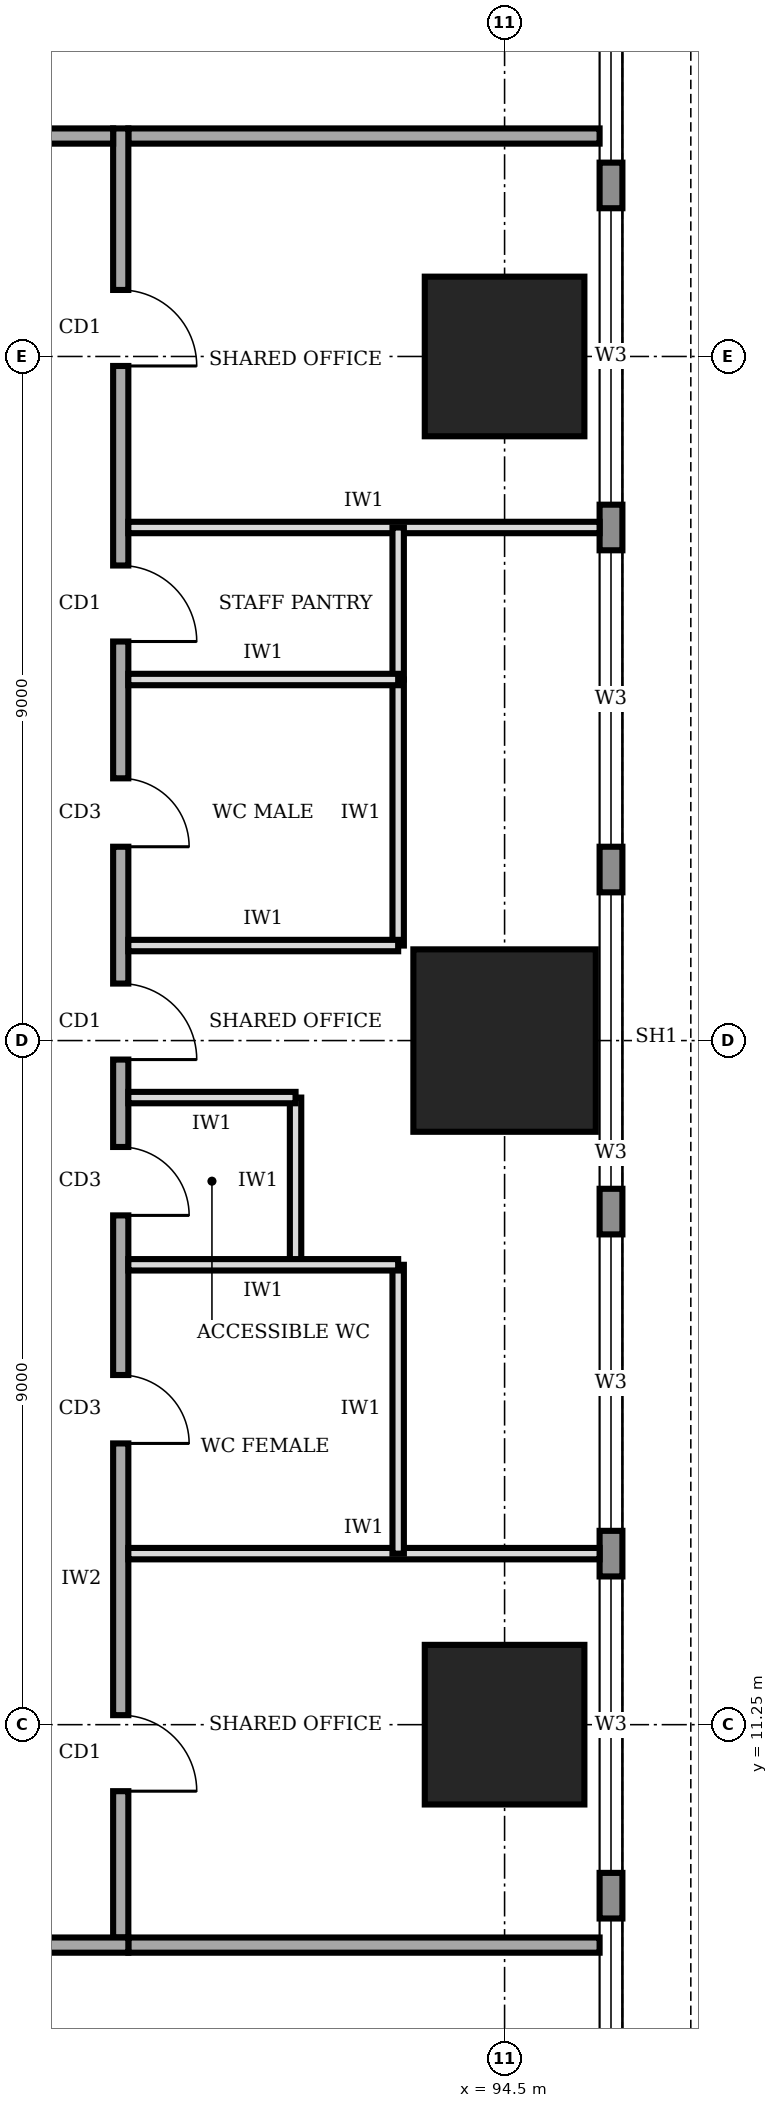
"""IFC4 building model, lengths in metres.
Left out: names, types, materials, properties, quantities, classifications, styles, units other than length and angle.
Written with IfcOpenShell. Run it as: python <this file> out.ifc"""

import sys

from ifc_helpers import new_model, si_unit, direction, frame, frame_2d, origin, origin_2d, place, context, subcontext, project, spatial, rectangle, extrude, element, fill, save


model = new_model("IFC4")
c1 = context("Model", 3, precision=1e-05, world=origin(), true_north=direction((0.0, 1.0)))
c2 = subcontext(c1, "Body", "Model", "MODEL_VIEW")
j1 = project(units=[si_unit("LENGTHUNIT", "METRE"), si_unit("PLANEANGLEUNIT", "RADIAN")], contexts=[c1])
p1 = place(None, origin())
s1 = spatial("IfcSite", under=j1, at=p1, CompositionType="ELEMENT")
p2 = place(p1, origin())
s2 = spatial("IfcBuilding", under=s1, at=p2, CompositionType="ELEMENT")
p3 = place(p2, frame((0.0, 0.0, 97.0)))
s3 = spatial("IfcBuildingStorey", under=s2, at=p3, CompositionType="ELEMENT", Elevation=97.0)
p4 = place(p3, frame((94.5, 11.25, 0.0), z_axis=(0.0, 0.0, 1.0), x_axis=(1.0, 0.0, 0.0)))
e1 = element("IfcColumn", 1, at=p4, inside=s3, PredefinedType="COLUMN", context=c2, shape_type="SweptSolid", body=[
    extrude(rectangle(XDim=2.1, YDim=2.1, at=origin_2d()), origin(), (0.0, 0.0, 1.0), 4.0),
])
p5 = place(p3, frame((94.5, 20.25, 0.0), z_axis=(0.0, 0.0, 1.0), x_axis=(1.0, 0.0, 0.0)))
e2 = element("IfcColumn", 2, at=p5, inside=s3, PredefinedType="COLUMN", context=c2, shape_type="SweptSolid", body=[
    extrude(rectangle(XDim=2.4, YDim=2.4, at=origin_2d()), origin(), (0.0, 0.0, 1.0), 4.0),
])
p6 = place(p3, frame((94.5, 29.25, 0.0), z_axis=(0.0, 0.0, 1.0), x_axis=(1.0, 0.0, 0.0)))
e3 = element("IfcColumn", 3, at=p6, inside=s3, PredefinedType="COLUMN", context=c2, shape_type="SweptSolid", body=[
    extrude(rectangle(XDim=2.1, YDim=2.1, at=origin_2d()), origin(), (0.0, 0.0, 1.0), 4.0),
])
p7 = place(p3, frame((95.9, 3.32, 0.0), z_axis=(0.0, 0.0, 1.0), x_axis=(0.0, 1.0, 0.0)))
e4 = element("IfcWall", 4, at=p7, inside=s3, PredefinedType="STANDARD", context=c2, shape_type="SweptSolid", body=[
    extrude(rectangle(XDim=33.96, YDim=0.3, at=frame_2d((16.98, 0.0))), origin(), (0.0, 0.0, 1.0), 3.75),
])
p8 = place(p7, frame((1.48, 0.0, 0.95)))
e5 = element("IfcOpeningElement", 5, at=p8, cuts=e4, PredefinedType="OPENING", context=c2, shape_type="SweptSolid", body=[
    extrude(rectangle(XDim=3.9, YDim=1.8, at=frame_2d((1.95, 0.9))), frame((0.0, 0.16, 0.0), z_axis=(0.0, -1.0, 0.0), x_axis=(1.0, 0.0, 0.0)), (0.0, 0.0, 1.0), 0.32),
])
p9 = place(p7, frame((5.98, 0.0, 0.95)))
e6 = element("IfcOpeningElement", 6, at=p9, cuts=e4, PredefinedType="OPENING", context=c2, shape_type="SweptSolid", body=[
    extrude(rectangle(XDim=3.9, YDim=1.8, at=frame_2d((1.95, 0.9))), frame((0.0, 0.16, 0.0), z_axis=(0.0, -1.0, 0.0), x_axis=(1.0, 0.0, 0.0)), (0.0, 0.0, 1.0), 0.32),
])
p10 = place(p7, frame((10.48, 0.0, 0.95)))
e7 = element("IfcOpeningElement", 7, at=p10, cuts=e4, PredefinedType="OPENING", context=c2, shape_type="SweptSolid", body=[
    extrude(rectangle(XDim=3.9, YDim=1.8, at=frame_2d((1.95, 0.9))), frame((0.0, 0.16, 0.0), z_axis=(0.0, -1.0, 0.0), x_axis=(1.0, 0.0, 0.0)), (0.0, 0.0, 1.0), 0.32),
])
p11 = place(p7, frame((14.98, 0.0, 0.95)))
e8 = element("IfcOpeningElement", 8, at=p11, cuts=e4, PredefinedType="OPENING", context=c2, shape_type="SweptSolid", body=[
    extrude(rectangle(XDim=3.9, YDim=1.8, at=frame_2d((1.95, 0.9))), frame((0.0, 0.16, 0.0), z_axis=(0.0, -1.0, 0.0), x_axis=(1.0, 0.0, 0.0)), (0.0, 0.0, 1.0), 0.32),
])
p12 = place(p7, frame((19.48, 0.0, 0.95)))
e9 = element("IfcOpeningElement", 9, at=p12, cuts=e4, PredefinedType="OPENING", context=c2, shape_type="SweptSolid", body=[
    extrude(rectangle(XDim=3.9, YDim=1.8, at=frame_2d((1.95, 0.9))), frame((0.0, 0.16, 0.0), z_axis=(0.0, -1.0, 0.0), x_axis=(1.0, 0.0, 0.0)), (0.0, 0.0, 1.0), 0.32),
])
p13 = place(p7, frame((23.98, 0.0, 0.95)))
e10 = element("IfcOpeningElement", 10, at=p13, cuts=e4, PredefinedType="OPENING", context=c2, shape_type="SweptSolid", body=[
    extrude(rectangle(XDim=3.9, YDim=1.8, at=frame_2d((1.95, 0.9))), frame((0.0, 0.16, 0.0), z_axis=(0.0, -1.0, 0.0), x_axis=(1.0, 0.0, 0.0)), (0.0, 0.0, 1.0), 0.32),
])
p14 = place(p7, frame((28.48, 0.0, 0.95)))
e11 = element("IfcOpeningElement", 11, at=p14, cuts=e4, PredefinedType="OPENING", context=c2, shape_type="SweptSolid", body=[
    extrude(rectangle(XDim=3.9, YDim=1.8, at=frame_2d((1.95, 0.9))), frame((0.0, 0.16, 0.0), z_axis=(0.0, -1.0, 0.0), x_axis=(1.0, 0.0, 0.0)), (0.0, 0.0, 1.0), 0.32),
])
p15 = place(p3, frame((63.3, 8.35, 0.0), z_axis=(0.0, 0.0, 1.0), x_axis=(1.0, 0.0, 0.0)))
e12 = element("IfcWall", 12, at=p15, inside=s3, PredefinedType="SOLIDWALL", context=c2, shape_type="SweptSolid", body=[
    extrude(rectangle(XDim=26.25, YDim=0.2, at=frame_2d((13.125, 0.0))), origin(), (0.0, 0.0, 1.0), 3.75),
])
p16 = place(p15, frame((8.25, 0.0, 0.0)))
e13 = element("IfcOpeningElement", 13, at=p16, cuts=e12, PredefinedType="OPENING", context=c2, shape_type="SweptSolid", body=[
    extrude(rectangle(XDim=1.0, YDim=2.1, at=frame_2d((0.5, 1.05))), frame((0.0, 0.11, 0.0), z_axis=(0.0, -1.0, 0.0), x_axis=(1.0, 0.0, 0.0)), (0.0, 0.0, 1.0), 0.22),
])
p17 = place(p15, frame((19.45, 0.0, 0.0)))
e14 = element("IfcOpeningElement", 14, at=p17, cuts=e12, PredefinedType="OPENING", context=c2, shape_type="SweptSolid", body=[
    extrude(rectangle(XDim=1.0, YDim=2.1, at=frame_2d((0.5, 1.05))), frame((0.0, 0.11, 0.0), z_axis=(0.0, -1.0, 0.0), x_axis=(1.0, 0.0, 0.0)), (0.0, 0.0, 1.0), 0.22),
])
p18 = place(p15, frame((23.825, 0.0, 0.0)))
e15 = element("IfcOpeningElement", 15, at=p18, cuts=e12, PredefinedType="OPENING", context=c2, shape_type="SweptSolid", body=[
    extrude(rectangle(XDim=1.0, YDim=2.1, at=frame_2d((0.5, 1.05))), frame((0.0, 0.11, 0.0), z_axis=(0.0, -1.0, 0.0), x_axis=(1.0, 0.0, 0.0)), (0.0, 0.0, 1.0), 0.22),
])
p19 = place(p3, frame((89.45, 8.45, 0.0), z_axis=(0.0, 0.0, 1.0), x_axis=(0.0, 1.0, 0.0)))
e16 = element("IfcWall", 16, at=p19, inside=s3, PredefinedType="SOLIDWALL", context=c2, shape_type="SweptSolid", body=[
    extrude(rectangle(XDim=23.8, YDim=0.2, at=frame_2d((11.9, 0.0))), origin(), (0.0, 0.0, 1.0), 3.75),
])
p20 = place(p19, frame((1.925, 0.0, 0.0)))
e17 = element("IfcOpeningElement", 17, at=p20, cuts=e16, PredefinedType="OPENING", context=c2, shape_type="SweptSolid", body=[
    extrude(rectangle(XDim=1.0, YDim=2.1, at=frame_2d((0.5, 1.05))), frame((0.0, 0.11, 0.0), z_axis=(0.0, -1.0, 0.0), x_axis=(1.0, 0.0, 0.0)), (0.0, 0.0, 1.0), 0.22),
])
p21 = place(p19, frame((6.5, 0.0, 0.0)))
e18 = element("IfcOpeningElement", 18, at=p21, cuts=e16, PredefinedType="OPENING", context=c2, shape_type="SweptSolid", body=[
    extrude(rectangle(XDim=0.9, YDim=2.1, at=frame_2d((0.45, 1.05))), frame((0.0, 0.11, 0.0), z_axis=(0.0, -1.0, 0.0), x_axis=(1.0, 0.0, 0.0)), (0.0, 0.0, 1.0), 0.22),
])
p22 = place(p19, frame((9.5, 0.0, 0.0)))
e19 = element("IfcOpeningElement", 19, at=p22, cuts=e16, PredefinedType="OPENING", context=c2, shape_type="SweptSolid", body=[
    extrude(rectangle(XDim=0.9, YDim=2.1, at=frame_2d((0.45, 1.05))), frame((0.0, 0.11, 0.0), z_axis=(0.0, -1.0, 0.0), x_axis=(1.0, 0.0, 0.0)), (0.0, 0.0, 1.0), 0.22),
])
p23 = place(p19, frame((14.35, 0.0, 0.0)))
e20 = element("IfcOpeningElement", 20, at=p23, cuts=e16, PredefinedType="OPENING", context=c2, shape_type="SweptSolid", body=[
    extrude(rectangle(XDim=0.9, YDim=2.1, at=frame_2d((0.45, 1.05))), frame((0.0, 0.11, 0.0), z_axis=(0.0, -1.0, 0.0), x_axis=(1.0, 0.0, 0.0)), (0.0, 0.0, 1.0), 0.22),
])
p24 = place(p19, frame((17.05, 0.0, 0.0)))
e21 = element("IfcOpeningElement", 21, at=p24, cuts=e16, PredefinedType="OPENING", context=c2, shape_type="SweptSolid", body=[
    extrude(rectangle(XDim=1.0, YDim=2.1, at=frame_2d((0.5, 1.05))), frame((0.0, 0.11, 0.0), z_axis=(0.0, -1.0, 0.0), x_axis=(1.0, 0.0, 0.0)), (0.0, 0.0, 1.0), 0.22),
])
p25 = place(p19, frame((11.55, 0.0, 0.0)))
e22 = element("IfcOpeningElement", 22, at=p25, cuts=e16, PredefinedType="OPENING", context=c2, shape_type="SweptSolid", body=[
    extrude(rectangle(XDim=1.0, YDim=2.1, at=frame_2d((0.5, 1.05))), frame((0.0, 0.11, 0.0), z_axis=(0.0, -1.0, 0.0), x_axis=(1.0, 0.0, 0.0)), (0.0, 0.0, 1.0), 0.22),
])
p26 = place(p19, frame((20.675, 0.0, 0.0)))
e23 = element("IfcOpeningElement", 23, at=p26, cuts=e16, PredefinedType="OPENING", context=c2, shape_type="SweptSolid", body=[
    extrude(rectangle(XDim=1.0, YDim=2.1, at=frame_2d((0.5, 1.05))), frame((0.0, 0.11, 0.0), z_axis=(0.0, -1.0, 0.0), x_axis=(1.0, 0.0, 0.0)), (0.0, 0.0, 1.0), 0.22),
])
p27 = place(p3, frame((89.35, 32.15, 0.0), z_axis=(0.0, 0.0, 1.0), x_axis=(-1.0, 0.0, 0.0)))
e24 = element("IfcWall", 24, at=p27, inside=s3, PredefinedType="SOLIDWALL", context=c2, shape_type="SweptSolid", body=[
    extrude(rectangle(XDim=26.05, YDim=0.2, at=frame_2d((13.025, 0.0))), origin(), (0.0, 0.0, 1.0), 3.75),
])
p28 = place(p27, frame((19.05, 0.0, 0.0)))
e25 = element("IfcOpeningElement", 25, at=p28, cuts=e24, PredefinedType="OPENING", context=c2, shape_type="SweptSolid", body=[
    extrude(rectangle(XDim=1.0, YDim=2.1, at=frame_2d((0.5, 1.05))), frame((0.0, 0.11, 0.0), z_axis=(0.0, -1.0, 0.0), x_axis=(1.0, 0.0, 0.0)), (0.0, 0.0, 1.0), 0.22),
])
p29 = place(p27, frame((7.85, 0.0, 0.0)))
e26 = element("IfcOpeningElement", 26, at=p29, cuts=e24, PredefinedType="OPENING", context=c2, shape_type="SweptSolid", body=[
    extrude(rectangle(XDim=1.0, YDim=2.1, at=frame_2d((0.5, 1.05))), frame((0.0, 0.11, 0.0), z_axis=(0.0, -1.0, 0.0), x_axis=(1.0, 0.0, 0.0)), (0.0, 0.0, 1.0), 0.22),
])
p30 = place(p27, frame((1.325, 0.0, 0.0)))
e27 = element("IfcOpeningElement", 27, at=p30, cuts=e24, PredefinedType="OPENING", context=c2, shape_type="SweptSolid", body=[
    extrude(rectangle(XDim=1.0, YDim=2.1, at=frame_2d((0.5, 1.05))), frame((0.0, 0.11, 0.0), z_axis=(0.0, -1.0, 0.0), x_axis=(1.0, 0.0, 0.0)), (0.0, 0.0, 1.0), 0.22),
])
for number, where, z_axis, x_axis in (
    (28, (89.55, 8.35, 0.0), (0.0, 0.0, 1.0), (1.0, 0.0, 0.0)),
    (29, (89.55, 32.15, 0.0), (0.0, 0.0, 1.0), (1.0, 0.0, 0.0)),
):
    element("IfcWall", number, at=place(p3, frame(where, z_axis=z_axis, x_axis=x_axis)), inside=s3, PredefinedType="SOLIDWALL", context=c2, shape_type="SweptSolid", body=[
        extrude(rectangle(XDim=6.2, YDim=0.2, at=frame_2d((3.1, 0.0))), origin(), (0.0, 0.0, 1.0), 3.75),
    ])
for number, where, z_axis, x_axis in (
    (30, (89.55, 13.5, 0.0), (0.0, 0.0, 1.0), (1.0, 0.0, 0.0)),
    (31, (89.55, 27.0, 0.0), (0.0, 0.0, 1.0), (1.0, 0.0, 0.0)),
):
    element("IfcWall", number, at=place(p3, frame(where, z_axis=z_axis, x_axis=x_axis)), inside=s3, PredefinedType="PARTITIONING", context=c2, shape_type="SweptSolid", body=[
        extrude(rectangle(XDim=6.2, YDim=0.15, at=frame_2d((3.1, 0.0))), origin(), (0.0, 0.0, 1.0), 3.75),
    ])
p31 = place(p3, frame((89.55, 17.3, 0.0), z_axis=(0.0, 0.0, 1.0), x_axis=(1.0, 0.0, 0.0)))
e32 = element("IfcWall", 32, at=p31, inside=s3, PredefinedType="PARTITIONING", context=c2, shape_type="SweptSolid", body=[
    extrude(rectangle(XDim=3.55, YDim=0.15, at=frame_2d((1.775, 0.0))), origin(), (0.0, 0.0, 1.0), 3.75),
])
p32 = place(p3, frame((89.55, 19.5, 0.0), z_axis=(0.0, 0.0, 1.0), x_axis=(1.0, 0.0, 0.0)))
e33 = element("IfcWall", 33, at=p32, inside=s3, PredefinedType="PARTITIONING", context=c2, shape_type="SweptSolid", body=[
    extrude(rectangle(XDim=2.2, YDim=0.15, at=frame_2d((1.1, 0.0))), origin(), (0.0, 0.0, 1.0), 2.85),
])
for number, where, z_axis, x_axis in (
    (34, (89.55, 21.5, 0.0), (0.0, 0.0, 1.0), (1.0, 0.0, 0.0)),
    (35, (89.55, 25.0, 0.0), (0.0, 0.0, 1.0), (1.0, 0.0, 0.0)),
):
    element("IfcWall", number, at=place(p3, frame(where, z_axis=z_axis, x_axis=x_axis)), inside=s3, PredefinedType="PARTITIONING", context=c2, shape_type="SweptSolid", body=[
        extrude(rectangle(XDim=3.55, YDim=0.15, at=frame_2d((1.775, 0.0))), origin(), (0.0, 0.0, 1.0), 3.75),
    ])
p33 = place(p3, frame((93.1, 13.5, 0.0), z_axis=(0.0, 0.0, 1.0), x_axis=(0.0, 1.0, 0.0)))
e36 = element("IfcWall", 36, at=p33, inside=s3, PredefinedType="PARTITIONING", context=c2, shape_type="SweptSolid", body=[
    extrude(rectangle(XDim=3.8, YDim=0.15, at=frame_2d((1.9, 0.0))), origin(), (0.0, 0.0, 1.0), 3.75),
])
p34 = place(p3, frame((91.75, 17.3, 0.0), z_axis=(0.0, 0.0, 1.0), x_axis=(0.0, 1.0, 0.0)))
e37 = element("IfcWall", 37, at=p34, inside=s3, PredefinedType="PARTITIONING", context=c2, shape_type="SweptSolid", body=[
    extrude(rectangle(XDim=2.2, YDim=0.15, at=frame_2d((1.1, 0.0))), origin(), (0.0, 0.0, 1.0), 3.75),
])
p35 = place(p3, frame((93.1, 21.5, 0.0), z_axis=(0.0, 0.0, 1.0), x_axis=(0.0, 1.0, 0.0)))
e38 = element("IfcWall", 38, at=p35, inside=s3, PredefinedType="PARTITIONING", context=c2, shape_type="SweptSolid", body=[
    extrude(rectangle(XDim=3.5, YDim=0.15, at=frame_2d((1.75, 0.0))), origin(), (0.0, 0.0, 1.0), 3.75),
])
p36 = place(p3, frame((93.1, 25.0, 0.0), z_axis=(0.0, 0.0, 1.0), x_axis=(0.0, 1.0, 0.0)))
e39 = element("IfcWall", 39, at=p36, inside=s3, PredefinedType="PARTITIONING", context=c2, shape_type="SweptSolid", body=[
    extrude(rectangle(XDim=2.0, YDim=0.15, at=frame_2d((1.0, 0.0))), origin(), (0.0, 0.0, 1.0), 3.75),
])
p37 = place(p8, origin())
e40 = element("IfcWindow", 40, at=p37, inside=s3, PartitioningType="SINGLE_PANEL", PredefinedType="WINDOW", context=c2, shape_type="SweptSolid", body=[
    extrude(rectangle(XDim=3.9, YDim=1.8, at=frame_2d((1.95, 0.9))), frame((0.0, 0.03, 0.0), z_axis=(0.0, -1.0, 0.0), x_axis=(1.0, 0.0, 0.0)), (0.0, 0.0, 1.0), 0.06),
])
fill(e5, e40)
p38 = place(p9, origin())
e41 = element("IfcWindow", 41, at=p38, inside=s3, PartitioningType="SINGLE_PANEL", PredefinedType="WINDOW", context=c2, shape_type="SweptSolid", body=[
    extrude(rectangle(XDim=3.9, YDim=1.8, at=frame_2d((1.95, 0.9))), frame((0.0, 0.03, 0.0), z_axis=(0.0, -1.0, 0.0), x_axis=(1.0, 0.0, 0.0)), (0.0, 0.0, 1.0), 0.06),
])
fill(e6, e41)
p39 = place(p10, origin())
e42 = element("IfcWindow", 42, at=p39, inside=s3, PartitioningType="SINGLE_PANEL", PredefinedType="WINDOW", context=c2, shape_type="SweptSolid", body=[
    extrude(rectangle(XDim=3.9, YDim=1.8, at=frame_2d((1.95, 0.9))), frame((0.0, 0.03, 0.0), z_axis=(0.0, -1.0, 0.0), x_axis=(1.0, 0.0, 0.0)), (0.0, 0.0, 1.0), 0.06),
])
fill(e7, e42)
p40 = place(p11, origin())
e43 = element("IfcWindow", 43, at=p40, inside=s3, PartitioningType="SINGLE_PANEL", PredefinedType="WINDOW", context=c2, shape_type="SweptSolid", body=[
    extrude(rectangle(XDim=3.9, YDim=1.8, at=frame_2d((1.95, 0.9))), frame((0.0, 0.03, 0.0), z_axis=(0.0, -1.0, 0.0), x_axis=(1.0, 0.0, 0.0)), (0.0, 0.0, 1.0), 0.06),
])
fill(e8, e43)
p41 = place(p12, origin())
e44 = element("IfcWindow", 44, at=p41, inside=s3, PartitioningType="SINGLE_PANEL", PredefinedType="WINDOW", context=c2, shape_type="SweptSolid", body=[
    extrude(rectangle(XDim=3.9, YDim=1.8, at=frame_2d((1.95, 0.9))), frame((0.0, 0.03, 0.0), z_axis=(0.0, -1.0, 0.0), x_axis=(1.0, 0.0, 0.0)), (0.0, 0.0, 1.0), 0.06),
])
fill(e9, e44)
p42 = place(p13, origin())
e45 = element("IfcWindow", 45, at=p42, inside=s3, PartitioningType="SINGLE_PANEL", PredefinedType="WINDOW", context=c2, shape_type="SweptSolid", body=[
    extrude(rectangle(XDim=3.9, YDim=1.8, at=frame_2d((1.95, 0.9))), frame((0.0, 0.03, 0.0), z_axis=(0.0, -1.0, 0.0), x_axis=(1.0, 0.0, 0.0)), (0.0, 0.0, 1.0), 0.06),
])
fill(e10, e45)
p43 = place(p14, origin())
e46 = element("IfcWindow", 46, at=p43, inside=s3, PartitioningType="SINGLE_PANEL", PredefinedType="WINDOW", context=c2, shape_type="SweptSolid", body=[
    extrude(rectangle(XDim=3.9, YDim=1.8, at=frame_2d((1.95, 0.9))), frame((0.0, 0.03, 0.0), z_axis=(0.0, -1.0, 0.0), x_axis=(1.0, 0.0, 0.0)), (0.0, 0.0, 1.0), 0.06),
])
fill(e11, e46)
p44 = place(p20, frame((1.0, 0.0, 0.0), z_axis=(0.0, 0.0, 1.0), x_axis=(-1.0, 0.0, 0.0)))
e47 = element("IfcDoor", 47, at=p44, inside=s3, OperationType="SINGLE_SWING_RIGHT", PredefinedType="DOOR", context=c2, shape_type="SweptSolid", body=[
    extrude(rectangle(XDim=1.0, YDim=2.1, at=frame_2d((0.5, 1.05))), frame((0.0, 0.025, 0.0), z_axis=(0.0, -1.0, 0.0), x_axis=(1.0, 0.0, 0.0)), (0.0, 0.0, 1.0), 0.05),
])
fill(e17, e47)
p45 = place(p21, frame((0.9, 0.0, 0.0), z_axis=(0.0, 0.0, 1.0), x_axis=(-1.0, 0.0, 0.0)))
e48 = element("IfcDoor", 48, at=p45, inside=s3, OperationType="SINGLE_SWING_RIGHT", PredefinedType="DOOR", context=c2, shape_type="SweptSolid", body=[
    extrude(rectangle(XDim=0.9, YDim=2.1, at=frame_2d((0.45, 1.05))), frame((0.0, 0.025, 0.0), z_axis=(0.0, -1.0, 0.0), x_axis=(1.0, 0.0, 0.0)), (0.0, 0.0, 1.0), 0.05),
])
fill(e18, e48)
p46 = place(p22, frame((0.9, 0.0, 0.0), z_axis=(0.0, 0.0, 1.0), x_axis=(-1.0, 0.0, 0.0)))
e49 = element("IfcDoor", 49, at=p46, inside=s3, OperationType="SINGLE_SWING_RIGHT", PredefinedType="DOOR", context=c2, shape_type="SweptSolid", body=[
    extrude(rectangle(XDim=0.9, YDim=2.1, at=frame_2d((0.45, 1.05))), frame((0.0, 0.025, 0.0), z_axis=(0.0, -1.0, 0.0), x_axis=(1.0, 0.0, 0.0)), (0.0, 0.0, 1.0), 0.05),
])
fill(e19, e49)
p47 = place(p23, frame((0.9, 0.0, 0.0), z_axis=(0.0, 0.0, 1.0), x_axis=(-1.0, 0.0, 0.0)))
e50 = element("IfcDoor", 50, at=p47, inside=s3, OperationType="SINGLE_SWING_RIGHT", PredefinedType="DOOR", context=c2, shape_type="SweptSolid", body=[
    extrude(rectangle(XDim=0.9, YDim=2.1, at=frame_2d((0.45, 1.05))), frame((0.0, 0.025, 0.0), z_axis=(0.0, -1.0, 0.0), x_axis=(1.0, 0.0, 0.0)), (0.0, 0.0, 1.0), 0.05),
])
fill(e20, e50)
p48 = place(p24, frame((1.0, 0.0, 0.0), z_axis=(0.0, 0.0, 1.0), x_axis=(-1.0, 0.0, 0.0)))
e51 = element("IfcDoor", 51, at=p48, inside=s3, OperationType="SINGLE_SWING_RIGHT", PredefinedType="DOOR", context=c2, shape_type="SweptSolid", body=[
    extrude(rectangle(XDim=1.0, YDim=2.1, at=frame_2d((0.5, 1.05))), frame((0.0, 0.025, 0.0), z_axis=(0.0, -1.0, 0.0), x_axis=(1.0, 0.0, 0.0)), (0.0, 0.0, 1.0), 0.05),
])
fill(e21, e51)
p49 = place(p25, frame((1.0, 0.0, 0.0), z_axis=(0.0, 0.0, 1.0), x_axis=(-1.0, 0.0, 0.0)))
e52 = element("IfcDoor", 52, at=p49, inside=s3, OperationType="SINGLE_SWING_RIGHT", PredefinedType="DOOR", context=c2, shape_type="SweptSolid", body=[
    extrude(rectangle(XDim=1.0, YDim=2.1, at=frame_2d((0.5, 1.05))), frame((0.0, 0.025, 0.0), z_axis=(0.0, -1.0, 0.0), x_axis=(1.0, 0.0, 0.0)), (0.0, 0.0, 1.0), 0.05),
])
fill(e22, e52)
p50 = place(p26, frame((1.0, 0.0, 0.0), z_axis=(0.0, 0.0, 1.0), x_axis=(-1.0, 0.0, 0.0)))
e53 = element("IfcDoor", 53, at=p50, inside=s3, OperationType="SINGLE_SWING_RIGHT", PredefinedType="DOOR", context=c2, shape_type="SweptSolid", body=[
    extrude(rectangle(XDim=1.0, YDim=2.1, at=frame_2d((0.5, 1.05))), frame((0.0, 0.025, 0.0), z_axis=(0.0, -1.0, 0.0), x_axis=(1.0, 0.0, 0.0)), (0.0, 0.0, 1.0), 0.05),
])
fill(e23, e53)
save(model, sys.argv[1])
